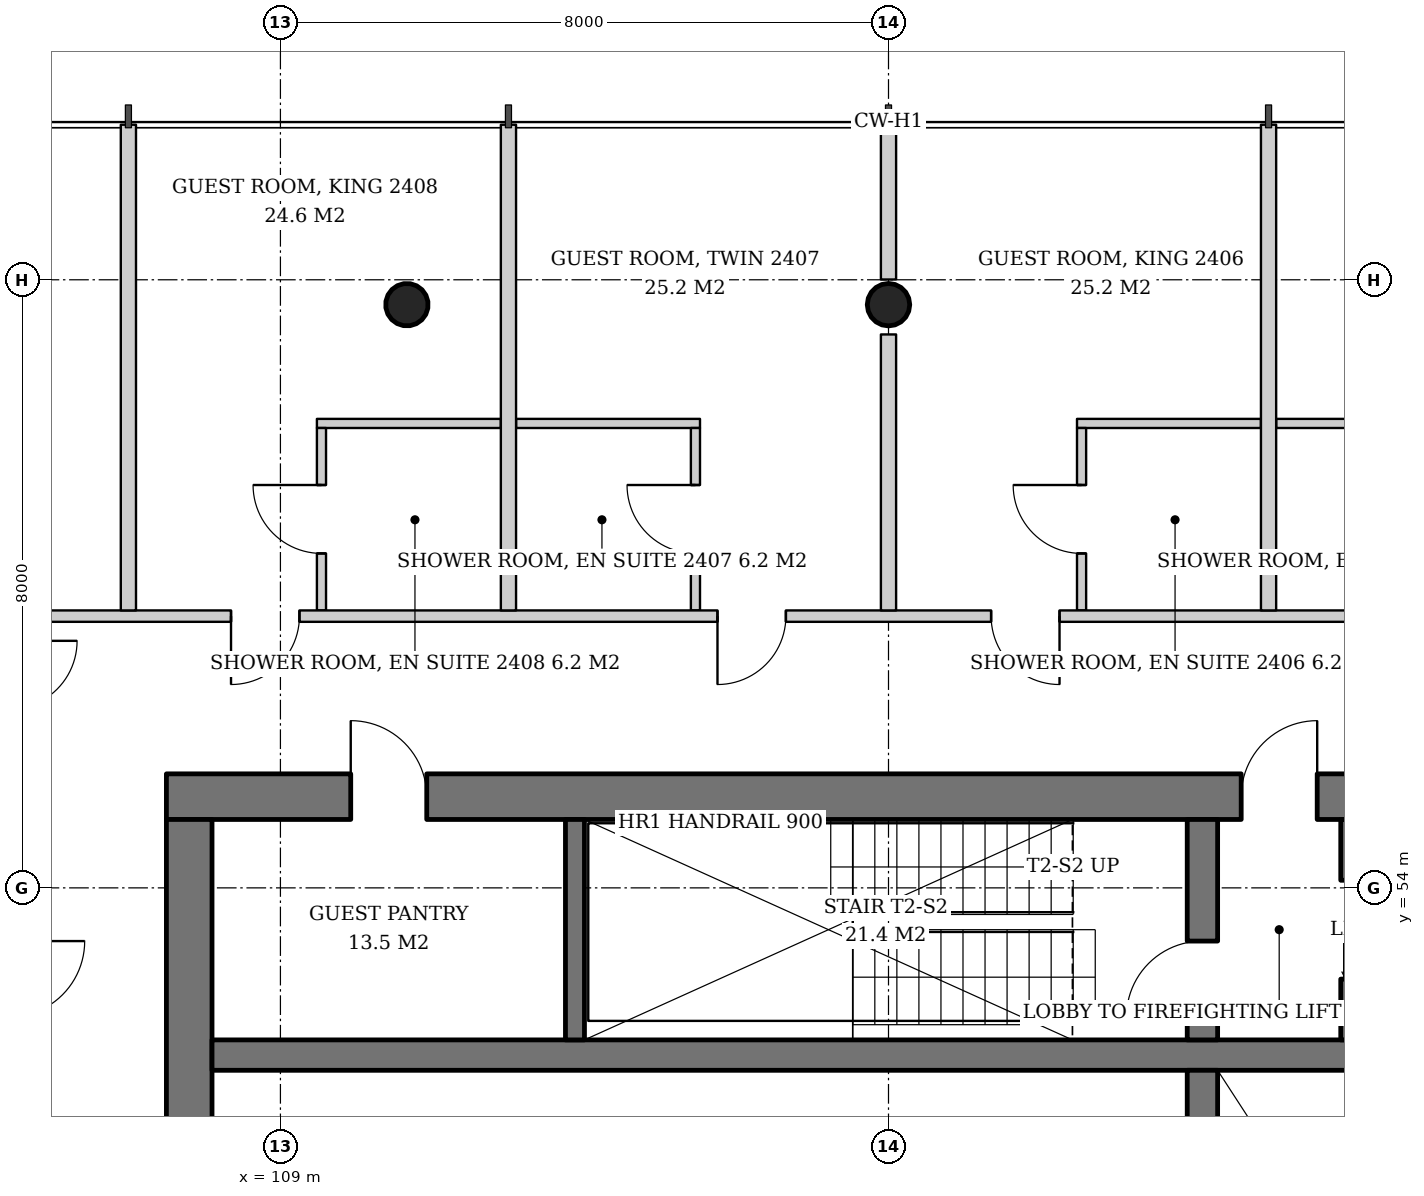
"""IFC4 building model, lengths in metres.
Left out: names, types, materials, properties, quantities, classifications, styles, units other than length and angle.
Written with IfcOpenShell. Run it as: python <this file> out.ifc"""

import sys

from ifc_helpers import new_model, si_unit, direction, frame, frame_2d, origin, origin_2d, place, context, subcontext, project, spatial, rectangle, hollow_circle, extrude, element, fill, save


model = new_model("IFC4")
c1 = context("Model", 3, precision=1e-05, world=origin(), true_north=direction((0.0, 1.0)))
c2 = subcontext(c1, "Body", "Model", "MODEL_VIEW")
j1 = project(units=[si_unit("LENGTHUNIT", "METRE"), si_unit("PLANEANGLEUNIT", "RADIAN")], contexts=[c1])
p1 = place(None, origin())
s1 = spatial("IfcSite", under=j1, at=p1, CompositionType="ELEMENT")
p2 = place(p1, origin())
s2 = spatial("IfcBuilding", under=s1, at=p2, CompositionType="ELEMENT")
p3 = place(p2, frame((0.0, 0.0, 97.0)))
s3 = spatial("IfcBuildingStorey", under=s2, at=p3, CompositionType="ELEMENT", Elevation=97.0)
p4 = place(p3, frame((117.0, 61.724, 0.0), z_axis=(0.0, -0.043069538298, 0.999072076915), x_axis=(1.0, 0.0, 0.0)))
e1 = element("IfcColumn", 1, at=p4, inside=s3, PredefinedType="COLUMN", context=c2, shape_type="SweptSolid", body=[
    extrude(hollow_circle(Radius=0.28, WallThickness=0.02, at=origin_2d()), origin(), (0.0, 0.0, 1.0), 3.803),
])
p5 = place(p3, frame((110.638, 61.724, 0.0), z_axis=(0.021497706284, -0.043059584825, 0.998841188968), x_axis=(0.894693706707, 0.446680166538, 0.0)))
e2 = element("IfcColumn", 2, at=p5, inside=s3, PredefinedType="COLUMN", context=c2, shape_type="SweptSolid", body=[
    extrude(hollow_circle(Radius=0.28, WallThickness=0.02, at=origin_2d()), origin(), (0.0, 0.0, 1.0), 3.804),
])
p6 = place(p3, frame((107.5, 55.2, 0.0), z_axis=(0.0, 0.0, 1.0), x_axis=(1.0, 0.0, 0.0)))
e3 = element("IfcWall", 3, at=p6, inside=s3, PredefinedType="SHEAR", context=c2, shape_type="SweptSolid", body=[
    extrude(rectangle(XDim=19.0, YDim=0.6, at=frame_2d((9.5, 0.0))), origin(), (0.0, 0.0, 1.0), 3.8),
])
p7 = place(p6, frame((14.14, 0.0, 0.0)))
e4 = element("IfcOpeningElement", 4, at=p7, cuts=e3, PredefinedType="OPENING", context=c2, shape_type="SweptSolid", body=[
    extrude(rectangle(XDim=1.0, YDim=2.1, at=frame_2d((0.5, 1.05))), frame((0.0, 0.31, 0.0), z_axis=(0.0, -1.0, 0.0), x_axis=(1.0, 0.0, 0.0)), (0.0, 0.0, 1.0), 0.62),
])
p8 = place(p6, frame((2.425, 0.0, 0.0)))
e5 = element("IfcOpeningElement", 5, at=p8, cuts=e3, PredefinedType="OPENING", context=c2, shape_type="SweptSolid", body=[
    extrude(rectangle(XDim=1.0, YDim=2.1, at=frame_2d((0.5, 1.05))), frame((0.0, 0.31, 0.0), z_axis=(0.0, -1.0, 0.0), x_axis=(1.0, 0.0, 0.0)), (0.0, 0.0, 1.0), 0.62),
])
p9 = place(p3, frame((107.8, 37.1, 0.0), z_axis=(0.0, 0.0, 1.0), x_axis=(0.0, 1.0, 0.0)))
e6 = element("IfcWall", 6, at=p9, inside=s3, PredefinedType="SHEAR", context=c2, shape_type="SweptSolid", body=[
    extrude(rectangle(XDim=17.8, YDim=0.6, at=frame_2d((8.9, 0.0))), origin(), (0.0, 0.0, 1.0), 3.8),
])
p10 = place(p9, frame((8.0, 0.0, 0.0)))
e7 = element("IfcOpeningElement", 7, at=p10, cuts=e6, PredefinedType="OPENING", context=c2, shape_type="SweptSolid", body=[
    extrude(rectangle(XDim=1.8, YDim=2.4, at=frame_2d((0.9, 1.2))), frame((0.0, 0.31, 0.0), z_axis=(0.0, -1.0, 0.0), x_axis=(1.0, 0.0, 0.0)), (0.0, 0.0, 1.0), 0.62),
])
p11 = place(p3, frame((108.1, 51.8, 0.0), z_axis=(0.0, 0.0, 1.0), x_axis=(1.0, 0.0, 0.0)))
e8 = element("IfcWall", 8, at=p11, inside=s3, PredefinedType="SHEAR", context=c2, shape_type="SweptSolid", body=[
    extrude(rectangle(XDim=17.8, YDim=0.4, at=frame_2d((8.9, 0.0))), origin(), (0.0, 0.0, 1.0), 3.8),
])
p12 = place(p3, frame((121.13, 40.4, 0.0), z_axis=(0.0, 0.0, 1.0), x_axis=(0.0, 1.0, 0.0)))
e9 = element("IfcWall", 9, at=p12, inside=s3, PredefinedType="SHEAR", context=c2, shape_type="SweptSolid", body=[
    extrude(rectangle(XDim=11.2, YDim=0.4, at=frame_2d((5.6, 0.0))), origin(), (0.0, 0.0, 1.0), 3.8),
])
p13 = place(p3, frame((121.13, 52.0, 0.0), z_axis=(0.0, 0.0, 1.0), x_axis=(0.0, 1.0, 0.0)))
e10 = element("IfcWall", 10, at=p13, inside=s3, PredefinedType="SHEAR", context=c2, shape_type="SweptSolid", body=[
    extrude(rectangle(XDim=2.9, YDim=0.4, at=frame_2d((1.45, 0.0))), origin(), (0.0, 0.0, 1.0), 3.8),
])
p14 = place(p13, frame((0.3, 0.0, 0.0)))
e11 = element("IfcOpeningElement", 11, at=p14, cuts=e10, PredefinedType="OPENING", context=c2, shape_type="SweptSolid", body=[
    extrude(rectangle(XDim=1.0, YDim=2.1, at=frame_2d((0.5, 1.05))), frame((0.0, 0.21, 0.0), z_axis=(0.0, -1.0, 0.0), x_axis=(1.0, 0.0, 0.0)), (0.0, 0.0, 1.0), 0.42),
])
p15 = place(p3, frame((112.875, 52.0, 0.0), z_axis=(0.0, 0.0, 1.0), x_axis=(0.0, 1.0, 0.0)))
e12 = element("IfcWall", 12, at=p15, inside=s3, PredefinedType="SHEAR", context=c2, shape_type="SweptSolid", body=[
    extrude(rectangle(XDim=2.9, YDim=0.25, at=frame_2d((1.45, 0.0))), origin(), (0.0, 0.0, 1.0), 3.8),
])
p16 = place(p3, frame((123.075, 52.0, 0.0), z_axis=(0.0, 0.0, 1.0), x_axis=(0.0, 1.0, 0.0)))
e13 = element("IfcWall", 13, at=p16, inside=s3, PredefinedType="SHEAR", context=c2, shape_type="SweptSolid", body=[
    extrude(rectangle(XDim=2.9, YDim=0.25, at=frame_2d((1.45, 0.0))), origin(), (0.0, 0.0, 1.0), 3.8),
])
p17 = place(p16, frame((0.8, 0.0, 0.0)))
e14 = element("IfcOpeningElement", 14, at=p17, cuts=e13, PredefinedType="OPENING", context=c2, shape_type="SweptSolid", body=[
    extrude(rectangle(XDim=1.3, YDim=2.2, at=frame_2d((0.65, 1.1))), frame((0.0, 0.135, 0.0), z_axis=(0.0, -1.0, 0.0), x_axis=(1.0, 0.0, 0.0)), (0.0, 0.0, 1.0), 0.27),
])
p18 = place(p3, frame((124.52, 60.11, 0.0), z_axis=(0.0, 0.0, 1.0), x_axis=(-1.0, 0.0, 0.0)))
e15 = element("IfcWall", 15, at=p18, inside=s3, PredefinedType="PARTITIONING", context=c2, shape_type="SweptSolid", body=[
    extrude(rectangle(XDim=2.42, YDim=0.12, at=frame_2d((1.21, 0.0))), origin(), (0.0, 0.0, 1.0), 3.0),
])
p19 = place(p3, frame((121.9, 60.11, 0.0), z_axis=(0.0, 0.0, 1.0), x_axis=(-1.0, 0.0, 0.0)))
e16 = element("IfcWall", 16, at=p19, inside=s3, PredefinedType="PARTITIONING", context=c2, shape_type="SweptSolid", body=[
    extrude(rectangle(XDim=2.42, YDim=0.12, at=frame_2d((1.21, 0.0))), origin(), (0.0, 0.0, 1.0), 3.6),
])
p20 = place(p3, frame((119.54, 57.65, 0.0), z_axis=(0.0, 0.0, 1.0), x_axis=(0.0, 1.0, 0.0)))
e17 = element("IfcWall", 17, at=p20, inside=s3, PredefinedType="PARTITIONING", context=c2, shape_type="SweptSolid", body=[
    extrude(rectangle(XDim=2.4, YDim=0.12, at=frame_2d((1.2, 0.0))), origin(), (0.0, 0.0, 1.0), 3.6),
])
p21 = place(p20, frame((0.75, 0.0, 0.0)))
e18 = element("IfcOpeningElement", 18, at=p21, cuts=e17, PredefinedType="OPENING", context=c2, shape_type="SweptSolid", body=[
    extrude(rectangle(XDim=0.9, YDim=2.1, at=frame_2d((0.45, 1.05))), frame((0.0, 0.07, 0.0), z_axis=(0.0, -1.0, 0.0), x_axis=(1.0, 0.0, 0.0)), (0.0, 0.0, 1.0), 0.14),
])
p22 = place(p3, frame((114.52, 60.11, 0.0), z_axis=(0.0, 0.0, 1.0), x_axis=(-1.0, 0.0, 0.0)))
e19 = element("IfcWall", 19, at=p22, inside=s3, PredefinedType="PARTITIONING", context=c2, shape_type="SweptSolid", body=[
    extrude(rectangle(XDim=2.42, YDim=0.12, at=frame_2d((1.21, 0.0))), origin(), (0.0, 0.0, 1.0), 3.0),
])
p23 = place(p3, frame((114.46, 57.65, 0.0), z_axis=(0.0, 0.0, 1.0), x_axis=(0.0, 1.0, 0.0)))
e20 = element("IfcWall", 20, at=p23, inside=s3, PredefinedType="PARTITIONING", context=c2, shape_type="SweptSolid", body=[
    extrude(rectangle(XDim=2.4, YDim=0.12, at=frame_2d((1.2, 0.0))), origin(), (0.0, 0.0, 1.0), 3.6),
])
p24 = place(p23, frame((0.75, 0.0, 0.0)))
e21 = element("IfcOpeningElement", 21, at=p24, cuts=e20, PredefinedType="OPENING", context=c2, shape_type="SweptSolid", body=[
    extrude(rectangle(XDim=0.9, YDim=2.1, at=frame_2d((0.45, 1.05))), frame((0.0, 0.07, 0.0), z_axis=(0.0, -1.0, 0.0), x_axis=(1.0, 0.0, 0.0)), (0.0, 0.0, 1.0), 0.14),
])
p25 = place(p3, frame((111.9, 60.11, 0.0), z_axis=(0.0, 0.0, 1.0), x_axis=(-1.0, 0.0, 0.0)))
e22 = element("IfcWall", 22, at=p25, inside=s3, PredefinedType="PARTITIONING", context=c2, shape_type="SweptSolid", body=[
    extrude(rectangle(XDim=2.42, YDim=0.12, at=frame_2d((1.21, 0.0))), origin(), (0.0, 0.0, 1.0), 3.0),
])
p26 = place(p3, frame((109.54, 57.65, 0.0), z_axis=(0.0, 0.0, 1.0), x_axis=(0.0, 1.0, 0.0)))
e23 = element("IfcWall", 23, at=p26, inside=s3, PredefinedType="PARTITIONING", context=c2, shape_type="SweptSolid", body=[
    extrude(rectangle(XDim=2.4, YDim=0.12, at=frame_2d((1.2, 0.0))), origin(), (0.0, 0.0, 1.0), 3.0),
])
p27 = place(p26, frame((0.75, 0.0, 0.0)))
e24 = element("IfcOpeningElement", 24, at=p27, cuts=e23, PredefinedType="OPENING", context=c2, shape_type="SweptSolid", body=[
    extrude(rectangle(XDim=0.9, YDim=2.1, at=frame_2d((0.45, 1.05))), frame((0.0, 0.07, 0.0), z_axis=(0.0, -1.0, 0.0), x_axis=(1.0, 0.0, 0.0)), (0.0, 0.0, 1.0), 0.14),
])
p28 = place(p3, frame((128.764, 57.575, 0.0), z_axis=(0.0, 0.0, 1.0), x_axis=(-1.0, 0.0, 0.0)))
e25 = element("IfcWall", 25, at=p28, inside=s3, PredefinedType="PARTITIONING", context=c2, shape_type="SweptSolid", body=[
    extrude(rectangle(XDim=23.527, YDim=0.15, at=frame_2d((11.764, 0.0))), origin(), (0.0, 0.0, 1.0), 2.9),
])
p29 = place(p28, frame((0.514, 0.0, 0.0)))
e26 = element("IfcOpeningElement", 26, at=p29, cuts=e25, PredefinedType="OPENING", context=c2, shape_type="SweptSolid", body=[
    extrude(rectangle(XDim=0.9, YDim=2.1, at=frame_2d((0.45, 1.05))), frame((0.0, 0.085, 0.0), z_axis=(0.0, -1.0, 0.0), x_axis=(1.0, 0.0, 0.0)), (0.0, 0.0, 1.0), 0.17),
])
p30 = place(p28, frame((3.114, 0.0, 0.0)))
e27 = element("IfcOpeningElement", 27, at=p30, cuts=e25, PredefinedType="OPENING", context=c2, shape_type="SweptSolid", body=[
    extrude(rectangle(XDim=0.9, YDim=2.1, at=frame_2d((0.45, 1.05))), frame((0.0, 0.085, 0.0), z_axis=(0.0, -1.0, 0.0), x_axis=(1.0, 0.0, 0.0)), (0.0, 0.0, 1.0), 0.17),
])
p31 = place(p28, frame((9.514, 0.0, 0.0)))
e28 = element("IfcOpeningElement", 28, at=p31, cuts=e25, PredefinedType="OPENING", context=c2, shape_type="SweptSolid", body=[
    extrude(rectangle(XDim=0.9, YDim=2.1, at=frame_2d((0.45, 1.05))), frame((0.0, 0.085, 0.0), z_axis=(0.0, -1.0, 0.0), x_axis=(1.0, 0.0, 0.0)), (0.0, 0.0, 1.0), 0.17),
])
p32 = place(p28, frame((13.114, 0.0, 0.0)))
e29 = element("IfcOpeningElement", 29, at=p32, cuts=e25, PredefinedType="OPENING", context=c2, shape_type="SweptSolid", body=[
    extrude(rectangle(XDim=0.9, YDim=2.1, at=frame_2d((0.45, 1.05))), frame((0.0, 0.085, 0.0), z_axis=(0.0, -1.0, 0.0), x_axis=(1.0, 0.0, 0.0)), (0.0, 0.0, 1.0), 0.17),
])
p33 = place(p28, frame((19.514, 0.0, 0.0)))
e30 = element("IfcOpeningElement", 30, at=p33, cuts=e25, PredefinedType="OPENING", context=c2, shape_type="SweptSolid", body=[
    extrude(rectangle(XDim=0.9, YDim=2.1, at=frame_2d((0.45, 1.05))), frame((0.0, 0.085, 0.0), z_axis=(0.0, -1.0, 0.0), x_axis=(1.0, 0.0, 0.0)), (0.0, 0.0, 1.0), 0.17),
])
p34 = place(p3, frame((122.0, 57.65, 0.0), z_axis=(0.0, 0.0, 1.0), x_axis=(0.0, 1.0, 0.0)))
e31 = element("IfcWall", 31, at=p34, inside=s3, PredefinedType="PARTITIONING", context=c2, shape_type="SweptSolid", body=[
    extrude(rectangle(XDim=6.39, YDim=0.2, at=frame_2d((3.195, 0.0))), origin(), (0.0, 0.0, 1.0), 3.0),
])
p35 = place(p3, frame((117.0, 57.65, 0.0), z_axis=(0.0, 0.0, 1.0), x_axis=(0.0, 1.0, 0.0)))
e32 = element("IfcWall", 32, at=p35, inside=s3, PredefinedType="PARTITIONING", context=c2, shape_type="SweptSolid", body=[
    extrude(rectangle(XDim=3.631, YDim=0.2, at=frame_2d((1.815, 0.0))), origin(), (0.0, 0.0, 1.0), 3.6),
])
p36 = place(p3, frame((117.0, 62.004, 0.0), z_axis=(0.0, 0.0, 1.0), x_axis=(0.0, 1.0, 0.0)))
e33 = element("IfcWall", 33, at=p36, inside=s3, PredefinedType="PARTITIONING", context=c2, shape_type="SweptSolid", body=[
    extrude(rectangle(XDim=2.036, YDim=0.2, at=frame_2d((1.018, 0.0))), origin(), (0.0, 0.0, 1.0), 3.6),
])
for number, where, z_axis, x_axis in (
    (34, (112.0, 57.65, 0.0), (0.0, 0.0, 1.0), (0.0, 1.0, 0.0)),
    (35, (107.0, 57.65, 0.0), (0.0, 0.0, 1.0), (0.0, 1.0, 0.0)),
):
    element("IfcWall", number, at=place(p3, frame(where, z_axis=z_axis, x_axis=x_axis)), inside=s3, PredefinedType="PARTITIONING", context=c2, shape_type="SweptSolid", body=[
        extrude(rectangle(XDim=6.39, YDim=0.2, at=frame_2d((3.195, 0.0))), origin(), (0.0, 0.0, 1.0), 3.2),
    ])
p37 = place(p14, origin())
e36 = element("IfcDoor", 36, at=p37, inside=s3, OperationType="SINGLE_SWING_LEFT", PredefinedType="DOOR", context=c2, shape_type="SweptSolid", body=[
    extrude(rectangle(XDim=1.0, YDim=2.1, at=frame_2d((0.5, 1.05))), frame((0.0, 0.025, 0.0), z_axis=(0.0, -1.0, 0.0), x_axis=(1.0, 0.0, 0.0)), (0.0, 0.0, 1.0), 0.05),
])
fill(e11, e36)
p38 = place(p7, origin())
e37 = element("IfcDoor", 37, at=p38, inside=s3, OperationType="SINGLE_SWING_RIGHT", PredefinedType="DOOR", context=c2, shape_type="SweptSolid", body=[
    extrude(rectangle(XDim=1.0, YDim=2.1, at=frame_2d((0.5, 1.05))), frame((0.0, 0.025, 0.0), z_axis=(0.0, -1.0, 0.0), x_axis=(1.0, 0.0, 0.0)), (0.0, 0.0, 1.0), 0.05),
])
fill(e4, e37)
p39 = place(p8, origin())
e38 = element("IfcDoor", 38, at=p39, inside=s3, OperationType="SINGLE_SWING_LEFT", PredefinedType="DOOR", context=c2, shape_type="SweptSolid", body=[
    extrude(rectangle(XDim=1.0, YDim=2.1, at=frame_2d((0.5, 1.05))), frame((0.0, -0.24, 0.0), z_axis=(0.0, -1.0, 0.0), x_axis=(1.0, 0.0, 0.0)), (0.0, 0.0, 1.0), 0.05),
])
fill(e5, e38)
p40 = place(p21, origin())
e39 = element("IfcDoor", 39, at=p40, inside=s3, OperationType="SINGLE_SWING_RIGHT", PredefinedType="DOOR", context=c2, shape_type="SweptSolid", body=[
    extrude(rectangle(XDim=0.9, YDim=2.1, at=frame_2d((0.45, 1.05))), frame((0.0, 0.025, 0.0), z_axis=(0.0, -1.0, 0.0), x_axis=(1.0, 0.0, 0.0)), (0.0, 0.0, 1.0), 0.05),
])
fill(e18, e39)
p41 = place(p24, origin())
e40 = element("IfcDoor", 40, at=p41, inside=s3, OperationType="SINGLE_SWING_RIGHT", PredefinedType="DOOR", context=c2, shape_type="SweptSolid", body=[
    extrude(rectangle(XDim=0.9, YDim=2.1, at=frame_2d((0.45, 1.05))), frame((0.0, 0.025, 0.0), z_axis=(0.0, -1.0, 0.0), x_axis=(1.0, 0.0, 0.0)), (0.0, 0.0, 1.0), 0.05),
])
fill(e21, e40)
p42 = place(p27, origin())
e41 = element("IfcDoor", 41, at=p42, inside=s3, OperationType="SINGLE_SWING_RIGHT", PredefinedType="DOOR", context=c2, shape_type="SweptSolid", body=[
    extrude(rectangle(XDim=0.9, YDim=2.1, at=frame_2d((0.45, 1.05))), frame((0.0, 0.025, 0.0), z_axis=(0.0, -1.0, 0.0), x_axis=(1.0, 0.0, 0.0)), (0.0, 0.0, 1.0), 0.05),
])
fill(e24, e41)
p43 = place(p31, origin())
e42 = element("IfcDoor", 42, at=p43, inside=s3, OperationType="SINGLE_SWING_LEFT", PredefinedType="DOOR", context=c2, shape_type="SweptSolid", body=[
    extrude(rectangle(XDim=0.9, YDim=2.1, at=frame_2d((0.45, 1.05))), frame((0.0, 0.025, 0.0), z_axis=(0.0, -1.0, 0.0), x_axis=(1.0, 0.0, 0.0)), (0.0, 0.0, 1.0), 0.05),
])
fill(e28, e42)
p44 = place(p32, origin())
e43 = element("IfcDoor", 43, at=p44, inside=s3, OperationType="SINGLE_SWING_RIGHT", PredefinedType="DOOR", context=c2, shape_type="SweptSolid", body=[
    extrude(rectangle(XDim=0.9, YDim=2.1, at=frame_2d((0.45, 1.05))), frame((0.0, 0.025, 0.0), z_axis=(0.0, -1.0, 0.0), x_axis=(1.0, 0.0, 0.0)), (0.0, 0.0, 1.0), 0.05),
])
fill(e29, e43)
p45 = place(p33, origin())
e44 = element("IfcDoor", 44, at=p45, inside=s3, OperationType="SINGLE_SWING_RIGHT", PredefinedType="DOOR", context=c2, shape_type="SweptSolid", body=[
    extrude(rectangle(XDim=0.9, YDim=2.1, at=frame_2d((0.45, 1.05))), frame((0.0, 0.025, 0.0), z_axis=(0.0, -1.0, 0.0), x_axis=(1.0, 0.0, 0.0)), (0.0, 0.0, 1.0), 0.05),
])
fill(e30, e44)
save(model, sys.argv[1])
